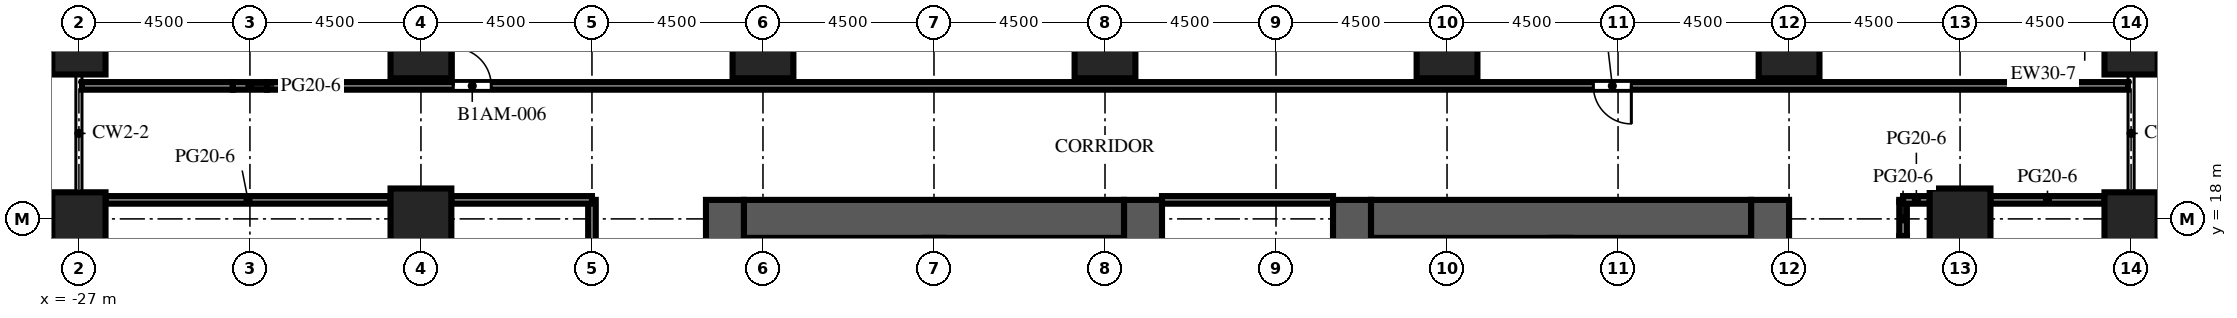
"""IFC4 building model, lengths in metres.
Left out: names, types, materials, properties, quantities, classifications, styles, units other than length and angle.
Written with IfcOpenShell. Run it as: python <this file> out.ifc"""

import sys

from ifc_helpers import new_model, si_unit, direction, frame, frame_2d, origin, origin_2d, place, context, subcontext, project, spatial, rectangle, extrude, element, fill, save


model = new_model("IFC4")
c1 = context("Model", 3, precision=1e-05, world=origin(), true_north=direction((0.0, 1.0)))
c2 = subcontext(c1, "Body", "Model", "MODEL_VIEW")
j1 = project(units=[si_unit("LENGTHUNIT", "METRE"), si_unit("PLANEANGLEUNIT", "RADIAN")], contexts=[c1])
p1 = place(None, origin())
s1 = spatial("IfcSite", under=j1, at=p1, CompositionType="ELEMENT")
p2 = place(p1, origin())
s2 = spatial("IfcBuilding", under=s1, at=p2, CompositionType="ELEMENT")
p3 = place(p2, frame((0.0, 0.0, 35.9)))
s3 = spatial("IfcBuildingStorey", under=s2, at=p3, CompositionType="ELEMENT", Elevation=35.9)
p4 = place(p3, frame((-27.0, 18.0, 0.0), z_axis=(0.0, 0.0, 1.0), x_axis=(1.0, 0.0, 0.0)))
e1 = element("IfcColumn", 1, at=p4, inside=s3, PredefinedType="COLUMN", context=c2, shape_type="SweptSolid", body=[
    extrude(rectangle(XDim=1.4, YDim=1.4, at=origin_2d()), origin(), (0.0, 0.0, 1.0), 3.75),
])
p5 = place(p3, frame((-27.0, 22.5, 0.0), z_axis=(0.0, 0.0, 1.0), x_axis=(1.0, 0.0, 0.0)))
e2 = element("IfcColumn", 2, at=p5, inside=s3, PredefinedType="COLUMN", context=c2, shape_type="SweptSolid", body=[
    extrude(rectangle(XDim=1.4, YDim=1.4, at=origin_2d()), origin(), (0.0, 0.0, 1.0), 6.0),
])
p6 = place(p3, frame((27.0, 18.0, 0.0), z_axis=(0.0, 0.0, 1.0), x_axis=(1.0, 0.0, 0.0)))
e3 = element("IfcColumn", 3, at=p6, inside=s3, PredefinedType="COLUMN", context=c2, shape_type="SweptSolid", body=[
    extrude(rectangle(XDim=1.4, YDim=1.4, at=origin_2d()), origin(), (0.0, 0.0, 1.0), 5.55),
])
p7 = place(p3, frame((27.0, 22.5, 0.0), z_axis=(0.0, 0.0, 1.0), x_axis=(1.0, 0.0, 0.0)))
e4 = element("IfcColumn", 4, at=p7, inside=s3, PredefinedType="COLUMN", context=c2, shape_type="SweptSolid", body=[
    extrude(rectangle(XDim=1.4, YDim=1.4, at=origin_2d()), origin(), (0.0, 0.0, 1.0), 6.0),
])
p8 = place(p3, frame((-18.0, 18.0, 0.0), z_axis=(0.0, 0.0, 1.0), x_axis=(1.0, 0.0, 0.0)))
e5 = element("IfcColumn", 5, at=p8, inside=s3, PredefinedType="COLUMN", context=c2, shape_type="SweptSolid", body=[
    extrude(rectangle(XDim=1.6, YDim=1.6, at=origin_2d()), origin(), (0.0, 0.0, 1.0), 5.55),
])
for number, where, z_axis, x_axis in (
    (6, (-18.0, 22.5, 0.0), (0.0, 0.0, 1.0), (1.0, 0.0, 0.0)),
    (7, (-9.0, 22.5, 0.0), (0.0, 0.0, 1.0), (1.0, 0.0, 0.0)),
    (8, (0.0, 22.5, 0.0), (0.0, 0.0, 1.0), (1.0, 0.0, 0.0)),
    (9, (9.0, 22.5, 0.0), (0.0, 0.0, 1.0), (1.0, 0.0, 0.0)),
    (10, (18.0, 22.5, 0.0), (0.0, 0.0, 1.0), (1.0, 0.0, 0.0)),
):
    element("IfcColumn", number, at=place(p3, frame(where, z_axis=z_axis, x_axis=x_axis)), inside=s3, PredefinedType="COLUMN", context=c2, shape_type="SweptSolid", body=[
        extrude(rectangle(XDim=1.6, YDim=1.6, at=origin_2d()), origin(), (0.0, 0.0, 1.0), 6.0),
    ])
p9 = place(p3, frame((22.5, 18.0, 0.0), z_axis=(0.0, 0.0, 1.0), x_axis=(1.0, 0.0, 0.0)))
e11 = element("IfcColumn", 11, at=p9, inside=s3, PredefinedType="COLUMN", context=c2, shape_type="SweptSolid", body=[
    extrude(rectangle(XDim=1.6, YDim=1.6, at=origin_2d()), origin(), (0.0, 0.0, 1.0), 5.55),
])
p10 = place(p3, frame((-10.0, -9.0, 0.0), z_axis=(0.0, 0.0, 1.0), x_axis=(0.0, 1.0, 0.0)))
e12 = element("IfcWall", 12, at=p10, inside=s3, PredefinedType="SHEAR", context=c2, shape_type="SweptSolid", body=[
    extrude(rectangle(XDim=27.5, YDim=1.0, at=frame_2d((13.75, 0.0))), origin(), (0.0, 0.0, 1.0), 6.0),
])
p11 = place(p10, frame((12.55, 0.0, 0.0)))
e13 = element("IfcOpeningElement", 13, at=p11, cuts=e12, PredefinedType="OPENING", context=c2, shape_type="SweptSolid", body=[
    extrude(rectangle(XDim=2.4, YDim=2.4, at=frame_2d((1.2, 1.2))), frame((0.0, 0.51, 0.0), z_axis=(0.0, -1.0, 0.0), x_axis=(1.0, 0.0, 0.0)), (0.0, 0.0, 1.0), 1.02),
])
p12 = place(p10, frame((6.825, 0.0, 0.0)))
e14 = element("IfcOpeningElement", 14, at=p12, cuts=e12, PredefinedType="OPENING", context=c2, shape_type="SweptSolid", body=[
    extrude(rectangle(XDim=1.2, YDim=2.1, at=frame_2d((0.6, 1.05))), frame((0.0, 0.51, 0.0), z_axis=(0.0, -1.0, 0.0), x_axis=(1.0, 0.0, 0.0)), (0.0, 0.0, 1.0), 1.02),
])
p13 = place(p10, frame((19.475, 0.0, 0.0)))
e15 = element("IfcOpeningElement", 15, at=p13, cuts=e12, PredefinedType="OPENING", context=c2, shape_type="SweptSolid", body=[
    extrude(rectangle(XDim=1.2, YDim=2.1, at=frame_2d((0.6, 1.05))), frame((0.0, 0.51, 0.0), z_axis=(0.0, -1.0, 0.0), x_axis=(1.0, 0.0, 0.0)), (0.0, 0.0, 1.0), 1.02),
])
p14 = place(p3, frame((1.0, -9.0, 0.0), z_axis=(0.0, 0.0, 1.0), x_axis=(0.0, 1.0, 0.0)))
e16 = element("IfcWall", 16, at=p14, inside=s3, PredefinedType="SHEAR", context=c2, shape_type="SweptSolid", body=[
    extrude(rectangle(XDim=27.5, YDim=1.0, at=frame_2d((13.75, 0.0))), origin(), (0.0, 0.0, 1.0), 6.0),
])
p15 = place(p14, frame((12.55, 0.0, 0.0)))
e17 = element("IfcOpeningElement", 17, at=p15, cuts=e16, PredefinedType="OPENING", context=c2, shape_type="SweptSolid", body=[
    extrude(rectangle(XDim=2.4, YDim=2.4, at=frame_2d((1.2, 1.2))), frame((0.0, 0.51, 0.0), z_axis=(0.0, -1.0, 0.0), x_axis=(1.0, 0.0, 0.0)), (0.0, 0.0, 1.0), 1.02),
])
p16 = place(p14, frame((4.025, 0.0, 0.0)))
e18 = element("IfcOpeningElement", 18, at=p16, cuts=e16, PredefinedType="OPENING", context=c2, shape_type="SweptSolid", body=[
    extrude(rectangle(XDim=1.2, YDim=2.1, at=frame_2d((0.6, 1.05))), frame((0.0, 0.51, 0.0), z_axis=(0.0, -1.0, 0.0), x_axis=(1.0, 0.0, 0.0)), (0.0, 0.0, 1.0), 1.02),
])
p17 = place(p14, frame((19.475, 0.0, 0.0)))
e19 = element("IfcOpeningElement", 19, at=p17, cuts=e16, PredefinedType="OPENING", context=c2, shape_type="SweptSolid", body=[
    extrude(rectangle(XDim=1.0, YDim=2.1, at=frame_2d((0.5, 1.05))), frame((0.0, 0.51, 0.0), z_axis=(0.0, -1.0, 0.0), x_axis=(1.0, 0.0, 0.0)), (0.0, 0.0, 1.0), 1.02),
])
p18 = place(p14, frame((21.106, 0.0, 0.0)))
e20 = element("IfcOpeningElement", 20, at=p18, cuts=e16, PredefinedType="OPENING", context=c2, shape_type="SweptSolid", body=[
    extrude(rectangle(XDim=1.0, YDim=2.1, at=frame_2d((0.5, 1.05))), frame((0.0, 0.51, 0.0), z_axis=(0.0, -1.0, 0.0), x_axis=(1.0, 0.0, 0.0)), (0.0, 0.0, 1.0), 1.02),
])
p19 = place(p14, frame((23.1, 0.0, 0.0)))
e21 = element("IfcOpeningElement", 21, at=p19, cuts=e16, PredefinedType="OPENING", context=c2, shape_type="SweptSolid", body=[
    extrude(rectangle(XDim=1.0, YDim=2.1, at=frame_2d((0.5, 1.05))), frame((0.0, 0.51, 0.0), z_axis=(0.0, -1.0, 0.0), x_axis=(1.0, 0.0, 0.0)), (0.0, 0.0, 1.0), 1.02),
])
p20 = place(p14, frame((25.094, 0.0, 0.0)))
e22 = element("IfcOpeningElement", 22, at=p20, cuts=e16, PredefinedType="OPENING", context=c2, shape_type="SweptSolid", body=[
    extrude(rectangle(XDim=1.0, YDim=2.1, at=frame_2d((0.5, 1.05))), frame((0.0, 0.51, 0.0), z_axis=(0.0, -1.0, 0.0), x_axis=(1.0, 0.0, 0.0)), (0.0, 0.0, 1.0), 1.02),
])
p21 = place(p3, frame((-9.5, 18.0, 0.0), z_axis=(0.0, 0.0, 1.0), x_axis=(1.0, 0.0, 0.0)))
e23 = element("IfcWall", 23, at=p21, inside=s3, PredefinedType="SHEAR", context=c2, shape_type="SweptSolid", body=[
    extrude(rectangle(XDim=10.0, YDim=1.0, at=frame_2d((5.0, 0.0))), origin(), (0.0, 0.0, 1.0), 6.0),
])
p22 = place(p3, frame((6.5, -9.0, 0.0), z_axis=(0.0, 0.0, 1.0), x_axis=(0.0, 1.0, 0.0)))
e24 = element("IfcWall", 24, at=p22, inside=s3, PredefinedType="SHEAR", context=c2, shape_type="SweptSolid", body=[
    extrude(rectangle(XDim=27.5, YDim=1.0, at=frame_2d((13.75, 0.0))), origin(), (0.0, 0.0, 1.0), 6.0),
])
p23 = place(p22, frame((12.55, 0.0, 0.0)))
e25 = element("IfcOpeningElement", 25, at=p23, cuts=e24, PredefinedType="OPENING", context=c2, shape_type="SweptSolid", body=[
    extrude(rectangle(XDim=2.4, YDim=2.4, at=frame_2d((1.2, 1.2))), frame((0.0, 0.51, 0.0), z_axis=(0.0, -1.0, 0.0), x_axis=(1.0, 0.0, 0.0)), (0.0, 0.0, 1.0), 1.02),
])
p24 = place(p22, frame((4.025, 0.0, 0.0)))
e26 = element("IfcOpeningElement", 26, at=p24, cuts=e24, PredefinedType="OPENING", context=c2, shape_type="SweptSolid", body=[
    extrude(rectangle(XDim=1.2, YDim=2.1, at=frame_2d((0.6, 1.05))), frame((0.0, 0.51, 0.0), z_axis=(0.0, -1.0, 0.0), x_axis=(1.0, 0.0, 0.0)), (0.0, 0.0, 1.0), 1.02),
])
p25 = place(p22, frame((19.475, 0.0, 0.0)))
e27 = element("IfcOpeningElement", 27, at=p25, cuts=e24, PredefinedType="OPENING", context=c2, shape_type="SweptSolid", body=[
    extrude(rectangle(XDim=1.0, YDim=2.1, at=frame_2d((0.5, 1.05))), frame((0.0, 0.51, 0.0), z_axis=(0.0, -1.0, 0.0), x_axis=(1.0, 0.0, 0.0)), (0.0, 0.0, 1.0), 1.02),
])
p26 = place(p22, frame((21.106, 0.0, 0.0)))
e28 = element("IfcOpeningElement", 28, at=p26, cuts=e24, PredefinedType="OPENING", context=c2, shape_type="SweptSolid", body=[
    extrude(rectangle(XDim=1.0, YDim=2.1, at=frame_2d((0.5, 1.05))), frame((0.0, 0.51, 0.0), z_axis=(0.0, -1.0, 0.0), x_axis=(1.0, 0.0, 0.0)), (0.0, 0.0, 1.0), 1.02),
])
p27 = place(p22, frame((23.1, 0.0, 0.0)))
e29 = element("IfcOpeningElement", 29, at=p27, cuts=e24, PredefinedType="OPENING", context=c2, shape_type="SweptSolid", body=[
    extrude(rectangle(XDim=1.0, YDim=2.1, at=frame_2d((0.5, 1.05))), frame((0.0, 0.51, 0.0), z_axis=(0.0, -1.0, 0.0), x_axis=(1.0, 0.0, 0.0)), (0.0, 0.0, 1.0), 1.02),
])
p28 = place(p22, frame((25.094, 0.0, 0.0)))
e30 = element("IfcOpeningElement", 30, at=p28, cuts=e24, PredefinedType="OPENING", context=c2, shape_type="SweptSolid", body=[
    extrude(rectangle(XDim=1.0, YDim=2.1, at=frame_2d((0.5, 1.05))), frame((0.0, 0.51, 0.0), z_axis=(0.0, -1.0, 0.0), x_axis=(1.0, 0.0, 0.0)), (0.0, 0.0, 1.0), 1.02),
])
p29 = place(p3, frame((17.5, -9.0, 0.0), z_axis=(0.0, 0.0, 1.0), x_axis=(0.0, 1.0, 0.0)))
e31 = element("IfcWall", 31, at=p29, inside=s3, PredefinedType="SHEAR", context=c2, shape_type="SweptSolid", body=[
    extrude(rectangle(XDim=27.5, YDim=1.0, at=frame_2d((13.75, 0.0))), origin(), (0.0, 0.0, 1.0), 6.0),
])
p30 = place(p29, frame((12.55, 0.0, 0.0)))
e32 = element("IfcOpeningElement", 32, at=p30, cuts=e31, PredefinedType="OPENING", context=c2, shape_type="SweptSolid", body=[
    extrude(rectangle(XDim=2.4, YDim=2.4, at=frame_2d((1.2, 1.2))), frame((0.0, 0.51, 0.0), z_axis=(0.0, -1.0, 0.0), x_axis=(1.0, 0.0, 0.0)), (0.0, 0.0, 1.0), 1.02),
])
p31 = place(p29, frame((6.825, 0.0, 0.0)))
e33 = element("IfcOpeningElement", 33, at=p31, cuts=e31, PredefinedType="OPENING", context=c2, shape_type="SweptSolid", body=[
    extrude(rectangle(XDim=1.2, YDim=2.1, at=frame_2d((0.6, 1.05))), frame((0.0, 0.51, 0.0), z_axis=(0.0, -1.0, 0.0), x_axis=(1.0, 0.0, 0.0)), (0.0, 0.0, 1.0), 1.02),
])
p32 = place(p29, frame((19.475, 0.0, 0.0)))
e34 = element("IfcOpeningElement", 34, at=p32, cuts=e31, PredefinedType="OPENING", context=c2, shape_type="SweptSolid", body=[
    extrude(rectangle(XDim=1.2, YDim=2.1, at=frame_2d((0.6, 1.05))), frame((0.0, 0.51, 0.0), z_axis=(0.0, -1.0, 0.0), x_axis=(1.0, 0.0, 0.0)), (0.0, 0.0, 1.0), 1.02),
])
p33 = place(p3, frame((7.0, 18.0, 0.0), z_axis=(0.0, 0.0, 1.0), x_axis=(1.0, 0.0, 0.0)))
e35 = element("IfcWall", 35, at=p33, inside=s3, PredefinedType="SHEAR", context=c2, shape_type="SweptSolid", body=[
    extrude(rectangle(XDim=10.0, YDim=1.0, at=frame_2d((5.0, 0.0))), origin(), (0.0, 0.0, 1.0), 6.0),
])
p34 = place(p3, frame((-13.5, -9.0, 0.0), z_axis=(0.0, 0.0, 1.0), x_axis=(0.0, 1.0, 0.0)))
e36 = element("IfcWall", 36, at=p34, inside=s3, PredefinedType="PARTITIONING", context=c2, shape_type="SweptSolid", body=[
    extrude(rectangle(XDim=27.5, YDim=0.2, at=frame_2d((13.75, 0.0))), origin(), (0.0, 0.0, 1.0), 5.55),
])
p35 = place(p34, frame((10.1, 0.0, 0.0)))
e37 = element("IfcOpeningElement", 37, at=p35, cuts=e36, PredefinedType="OPENING", context=c2, shape_type="SweptSolid", body=[
    extrude(rectangle(XDim=1.0, YDim=2.1, at=frame_2d((0.5, 1.05))), frame((0.0, 0.11, 0.0), z_axis=(0.0, -1.0, 0.0), x_axis=(1.0, 0.0, 0.0)), (0.0, 0.0, 1.0), 0.22),
])
p36 = place(p3, frame((21.0, 9.45, 0.0), z_axis=(0.0, 0.0, 1.0), x_axis=(0.0, 1.0, 0.0)))
e38 = element("IfcWall", 38, at=p36, inside=s3, PredefinedType="PARTITIONING", context=c2, shape_type="SweptSolid", body=[
    extrude(rectangle(XDim=8.1, YDim=0.2, at=frame_2d((4.05, 0.0))), origin(), (0.0, 0.0, 1.0), 5.55),
])
p37 = place(p3, frame((21.0, 17.55, 0.0), z_axis=(0.0, 0.0, 1.0), x_axis=(0.0, 1.0, 0.0)))
e39 = element("IfcWall", 39, at=p37, inside=s3, PredefinedType="PARTITIONING", context=c2, shape_type="SweptSolid", body=[
    extrude(rectangle(XDim=0.9, YDim=0.2, at=frame_2d((0.45, 0.0))), origin(), (0.0, 0.0, 1.0), 3.72),
])
p38 = place(p3, frame((21.0, 18.45, 0.0), z_axis=(0.0, 0.0, 1.0), x_axis=(0.0, 1.0, 0.0)))
e40 = element("IfcWall", 40, at=p38, inside=s3, PredefinedType="PARTITIONING", context=c2, shape_type="SweptSolid", body=[
    extrude(rectangle(XDim=0.05, YDim=0.2, at=frame_2d((0.025, 0.0))), origin(), (0.0, 0.0, 1.0), 5.55),
])
p39 = place(p3, frame((-26.3, 18.5, 0.0), z_axis=(0.0, 0.0, 1.0), x_axis=(1.0, 0.0, 0.0)))
e41 = element("IfcWall", 41, at=p39, inside=s3, PredefinedType="PARTITIONING", context=c2, shape_type="SweptSolid", body=[
    extrude(rectangle(XDim=7.5, YDim=0.2, at=frame_2d((3.75, 0.0))), origin(), (0.0, 0.0, 1.0), 3.72),
])
p40 = place(p3, frame((-17.2, 18.5, 0.0), z_axis=(0.0, 0.0, 1.0), x_axis=(1.0, 0.0, 0.0)))
e42 = element("IfcWall", 42, at=p40, inside=s3, PredefinedType="PARTITIONING", context=c2, shape_type="SweptSolid", body=[
    extrude(rectangle(XDim=3.7, YDim=0.2, at=frame_2d((1.85, 0.0))), origin(), (0.0, 0.0, 1.0), 5.55),
])
p41 = place(p3, frame((1.5, 18.5, 0.0), z_axis=(0.0, 0.0, 1.0), x_axis=(1.0, 0.0, 0.0)))
e43 = element("IfcWall", 43, at=p41, inside=s3, PredefinedType="PARTITIONING", context=c2, shape_type="SweptSolid", body=[
    extrude(rectangle(XDim=4.5, YDim=0.2, at=frame_2d((2.25, 0.0))), origin(), (0.0, 0.0, 1.0), 5.55),
])
p42 = place(p3, frame((21.0, 18.5, 0.0), z_axis=(0.0, 0.0, 1.0), x_axis=(1.0, 0.0, 0.0)))
e44 = element("IfcWall", 44, at=p42, inside=s3, PredefinedType="PARTITIONING", context=c2, shape_type="SweptSolid", body=[
    extrude(rectangle(XDim=0.7, YDim=0.2, at=frame_2d((0.35, 0.0))), origin(), (0.0, 0.0, 1.0), 3.72),
])
p43 = place(p3, frame((23.3, 18.5, 0.0), z_axis=(0.0, 0.0, 1.0), x_axis=(1.0, 0.0, 0.0)))
e45 = element("IfcWall", 45, at=p43, inside=s3, PredefinedType="PARTITIONING", context=c2, shape_type="SweptSolid", body=[
    extrude(rectangle(XDim=3.0, YDim=0.2, at=frame_2d((1.5, 0.0))), origin(), (0.0, 0.0, 1.0), 3.72),
])
p44 = place(p3, frame((-26.92, 21.5, 0.0), z_axis=(0.0, 0.0, 1.0), x_axis=(1.0, 0.0, 0.0)))
e46 = element("IfcWall", 46, at=p44, inside=s3, PredefinedType="PARTITIONING", context=c2, shape_type="SweptSolid", body=[
    extrude(rectangle(XDim=3.97, YDim=0.2, at=frame_2d((1.985, 0.0))), origin(), (0.0, 0.0, 1.0), 5.55),
])
p45 = place(p3, frame((-22.95, 21.5, 0.0), z_axis=(0.0, 0.0, 1.0), x_axis=(1.0, 0.0, 0.0)))
e47 = element("IfcWall", 47, at=p45, inside=s3, PredefinedType="PARTITIONING", context=c2, shape_type="SweptSolid", body=[
    extrude(rectangle(XDim=0.9, YDim=0.2, at=frame_2d((0.45, 0.0))), origin(), (0.0, 0.0, 1.0), 3.72),
])
p46 = place(p3, frame((-22.05, 21.5, 0.0), z_axis=(0.0, 0.0, 1.0), x_axis=(1.0, 0.0, 0.0)))
e48 = element("IfcWall", 48, at=p46, inside=s3, PredefinedType="PARTITIONING", context=c2, shape_type="SweptSolid", body=[
    extrude(rectangle(XDim=48.97, YDim=0.2, at=frame_2d((24.485, 0.0))), origin(), (0.0, 0.0, 1.0), 5.55),
])
p47 = place(p46, frame((4.9, 0.0, 0.0)))
e49 = element("IfcOpeningElement", 49, at=p47, cuts=e48, PredefinedType="OPENING", context=c2, shape_type="SweptSolid", body=[
    extrude(rectangle(XDim=1.0, YDim=2.1, at=frame_2d((0.5, 1.05))), frame((0.0, 0.11, 0.0), z_axis=(0.0, -1.0, 0.0), x_axis=(1.0, 0.0, 0.0)), (0.0, 0.0, 1.0), 0.22),
])
p48 = place(p46, frame((34.9, 0.0, 0.0)))
e50 = element("IfcOpeningElement", 50, at=p48, cuts=e48, PredefinedType="OPENING", context=c2, shape_type="SweptSolid", body=[
    extrude(rectangle(XDim=1.0, YDim=2.1, at=frame_2d((0.5, 1.05))), frame((0.0, 0.11, 0.0), z_axis=(0.0, -1.0, 0.0), x_axis=(1.0, 0.0, 0.0)), (0.0, 0.0, 1.0), 0.22),
])
p49 = place(p47, origin())
e51 = element("IfcDoor", 51, at=p49, inside=s3, OperationType="SINGLE_SWING_LEFT", PredefinedType="DOOR", context=c2, shape_type="SweptSolid", body=[
    extrude(rectangle(XDim=1.0, YDim=2.1, at=frame_2d((0.5, 1.05))), frame((0.0, 0.025, 0.0), z_axis=(0.0, -1.0, 0.0), x_axis=(1.0, 0.0, 0.0)), (0.0, 0.0, 1.0), 0.05),
])
fill(e49, e51)
p50 = place(p48, origin())
e52 = element("IfcDoor", 52, at=p50, inside=s3, OperationType="SINGLE_SWING_RIGHT", PredefinedType="DOOR", context=c2, shape_type="SweptSolid", body=[
    extrude(rectangle(XDim=1.0, YDim=2.1, at=frame_2d((0.5, 1.05))), frame((0.0, 0.025, 0.0), z_axis=(0.0, -1.0, 0.0), x_axis=(1.0, 0.0, 0.0)), (0.0, 0.0, 1.0), 0.05),
])
fill(e50, e52)
save(model, sys.argv[1])
